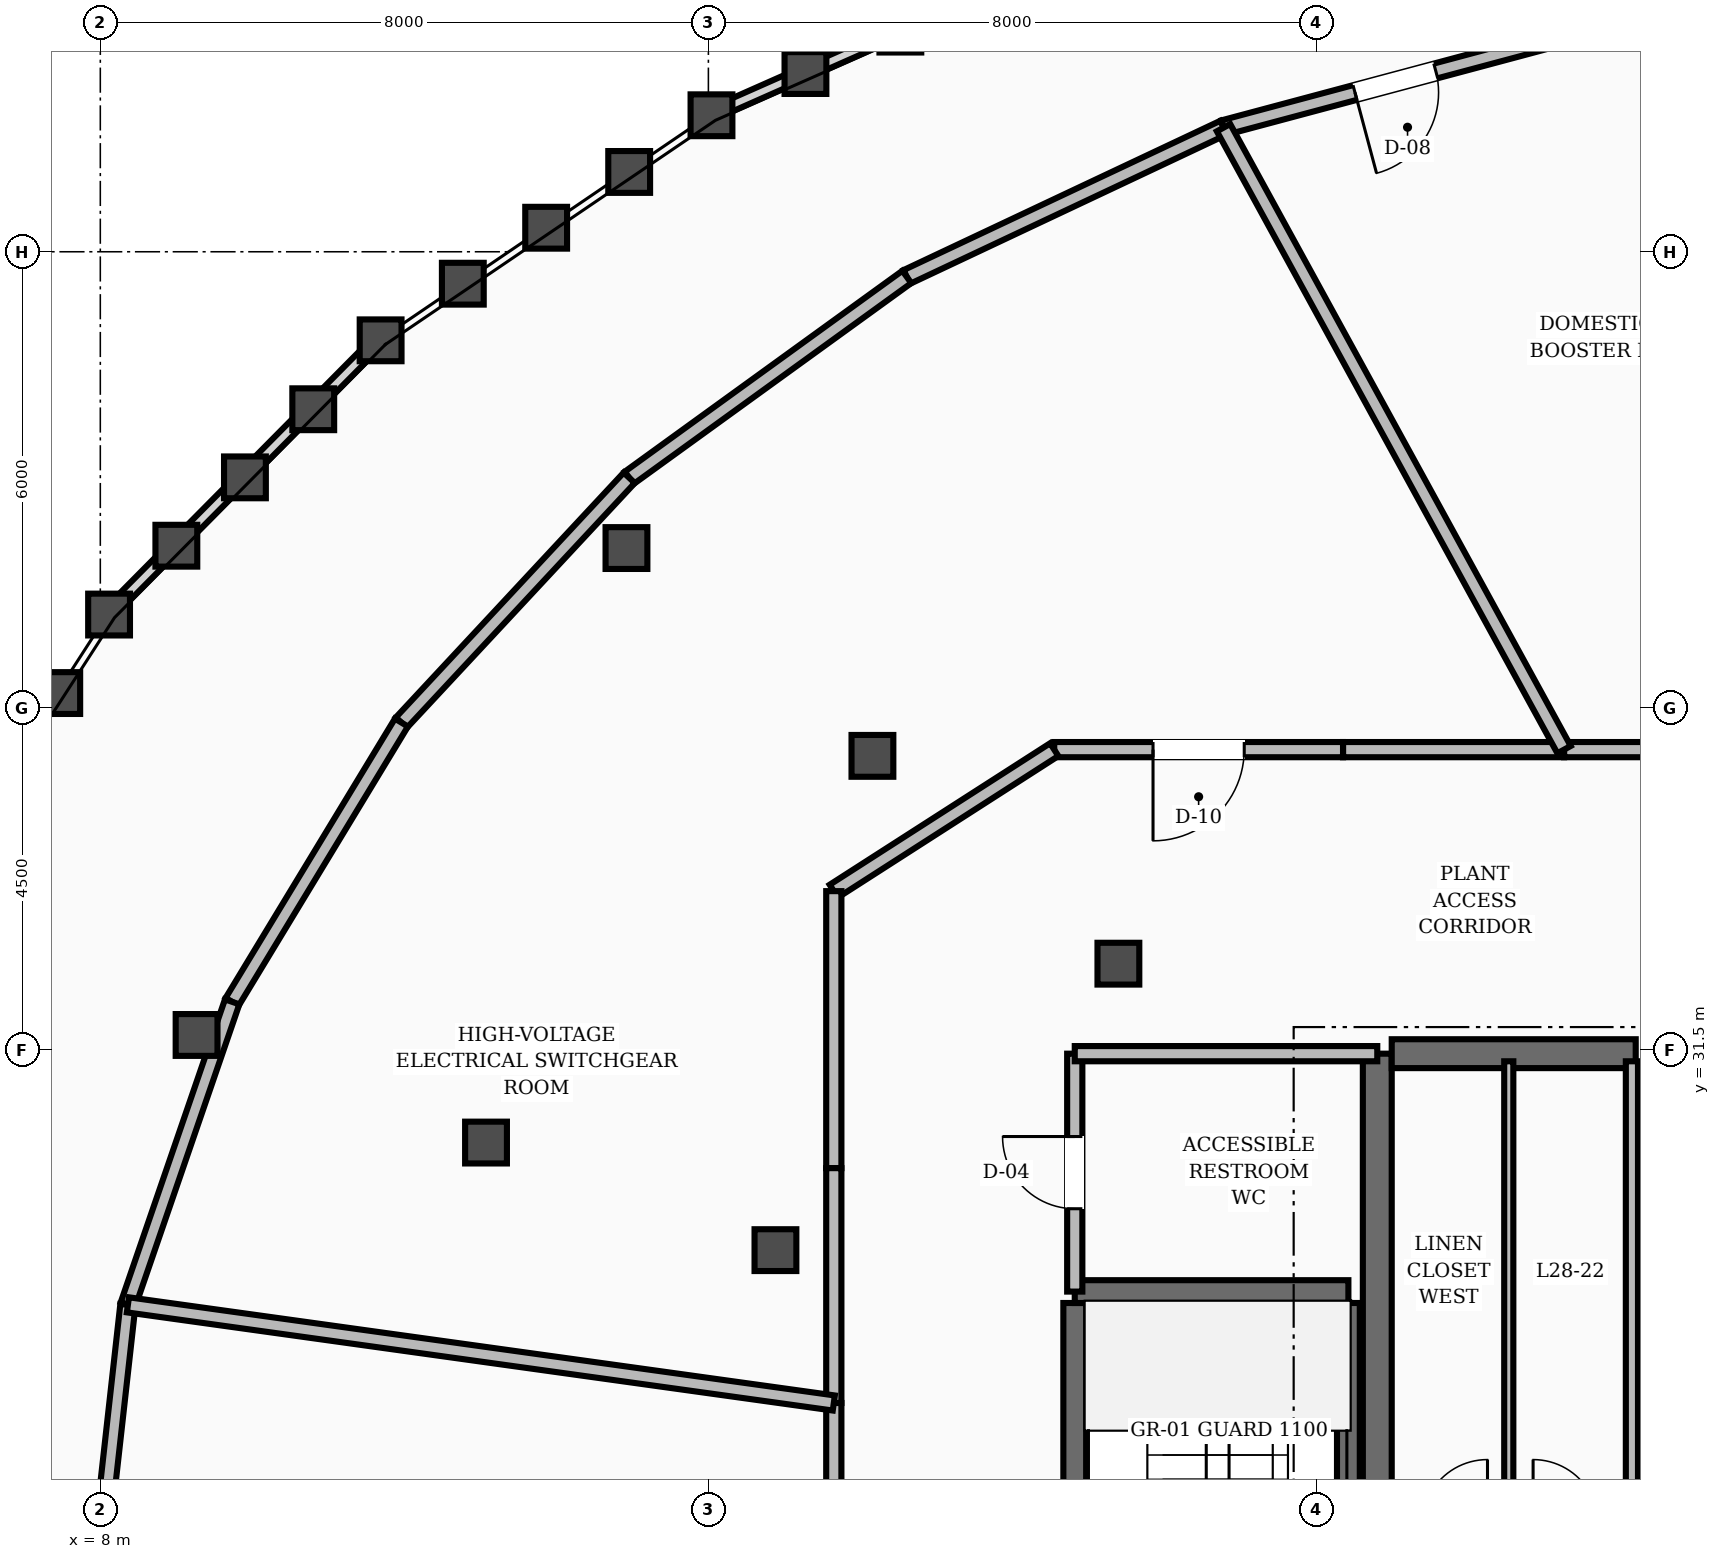
"""IFC4 building model, lengths in metres.
Left out: names, types, materials, properties, quantities, classifications, styles, units other than length and angle.
Written with IfcOpenShell. Run it as: python <this file> out.ifc"""

import sys

from ifc_helpers import new_model, si_unit, direction, frame, frame_2d, origin, place, context, subcontext, project, spatial, rectangle, extrude, element, fill, save


model = new_model("IFC4")
c1 = context("Model", 3, precision=1e-05, world=origin(), true_north=direction((0.0, 1.0)))
c2 = subcontext(c1, "Body", "Model", "MODEL_VIEW")
j1 = project(units=[si_unit("LENGTHUNIT", "METRE"), si_unit("PLANEANGLEUNIT", "RADIAN")], contexts=[c1])
p1 = place(None, origin())
s1 = spatial("IfcSite", under=j1, at=p1, CompositionType="ELEMENT")
p2 = place(p1, origin())
s2 = spatial("IfcBuilding", under=s1, at=p2, CompositionType="ELEMENT")
p3 = place(p2, frame((0.0, 0.0, 110.8)))
s3 = spatial("IfcBuildingStorey", under=s2, at=p3, CompositionType="ELEMENT", Elevation=110.8)
p4 = place(p3, frame((24.8, 25.15, 0.0), z_axis=(0.0, 0.0, 1.0), x_axis=(0.0, 1.0, 0.0)))
e1 = element("IfcWall", 1, at=p4, inside=s3, PredefinedType="SHEAR", context=c2, shape_type="SweptSolid", body=[
    extrude(rectangle(XDim=6.3, YDim=0.38, at=frame_2d((3.15, 0.0))), origin(), (0.0, 0.0, 1.0), 6.4),
])
p5 = place(p3, frame((24.99, 31.45, 0.0), z_axis=(0.0, 0.0, 1.0), x_axis=(1.0, 0.0, 0.0)))
e2 = element("IfcWall", 2, at=p5, inside=s3, PredefinedType="SHEAR", context=c2, shape_type="SweptSolid", body=[
    extrude(rectangle(XDim=3.21, YDim=0.38, at=frame_2d((1.605, 0.0))), origin(), (0.0, 0.0, 1.0), 6.4),
])
for number, where, z_axis, x_axis in (
    (3, (20.82, 19.43, 0.0), (0.0, 0.0, 1.0), (0.0, 1.0, 0.0)),
    (4, (24.42, 19.43, 0.0), (0.0, 0.0, 1.0), (0.0, 1.0, 0.0)),
):
    element("IfcWall", number, at=place(p3, frame(where, z_axis=z_axis, x_axis=x_axis)), inside=s3, PredefinedType="SHEAR", context=c2, shape_type="SweptSolid", body=[
        extrude(rectangle(XDim=8.74, YDim=0.3, at=frame_2d((4.37, 0.0))), origin(), (0.0, 0.0, 1.0), 6.4),
    ])
p6 = place(p3, frame((20.82, 28.32, 0.0), z_axis=(0.0, 0.0, 1.0), x_axis=(1.0, 0.0, 0.0)))
e5 = element("IfcWall", 5, at=p6, inside=s3, PredefinedType="SHEAR", context=c2, shape_type="SweptSolid", body=[
    extrude(rectangle(XDim=3.6, YDim=0.3, at=frame_2d((1.8, 0.0))), origin(), (0.0, 0.0, 1.0), 6.4),
])
p7 = place(p3, frame((20.82, 28.32, 0.0), z_axis=(0.0, 0.0, 1.0), x_axis=(0.0, 1.0, 0.0)))
e6 = element("IfcWall", 6, at=p7, inside=s3, PredefinedType="SOLIDWALL", context=c2, shape_type="SweptSolid", body=[
    extrude(rectangle(XDim=3.13, YDim=0.2, at=frame_2d((1.565, 0.0))), origin(), (0.0, 0.0, 1.0), 5.12),
])
p8 = place(p7, frame((1.09, 0.0, 0.0)))
e7 = element("IfcOpeningElement", 7, at=p8, cuts=e6, PredefinedType="OPENING", context=c2, shape_type="SweptSolid", body=[
    extrude(rectangle(XDim=0.95, YDim=2.1, at=frame_2d((0.475, 1.05))), frame((0.0, 0.11, 0.0), z_axis=(0.0, -1.0, 0.0), x_axis=(1.0, 0.0, 0.0)), (0.0, 0.0, 1.0), 0.22),
])
p9 = place(p3, frame((20.82, 31.45, 0.0), z_axis=(0.0, 0.0, 1.0), x_axis=(1.0, 0.0, 0.0)))
e8 = element("IfcWall", 8, at=p9, inside=s3, PredefinedType="SOLIDWALL", context=c2, shape_type="SweptSolid", body=[
    extrude(rectangle(XDim=3.98, YDim=0.2, at=frame_2d((1.99, 0.0))), origin(), (0.0, 0.0, 1.0), 5.12),
])
p10 = place(p3, frame((28.15, 25.25, 0.0), z_axis=(0.0, 0.0, 1.0), x_axis=(0.0, 1.0, 0.0)))
e9 = element("IfcWall", 9, at=p10, inside=s3, PredefinedType="SOLIDWALL", context=c2, shape_type="SweptSolid", body=[
    extrude(rectangle(XDim=6.1, YDim=0.16, at=frame_2d((3.05, 0.0))), origin(), (0.0, 0.0, 1.0), 5.12),
])
p11 = place(p3, frame((26.53, 25.25, 0.0), z_axis=(0.0, 0.0, 1.0), x_axis=(0.0, 1.0, 0.0)))
e10 = element("IfcWall", 10, at=p11, inside=s3, PredefinedType="PARTITIONING", context=c2, shape_type="SweptSolid", body=[
    extrude(rectangle(XDim=6.1, YDim=0.12, at=frame_2d((3.05, 0.0))), origin(), (0.0, 0.0, 1.0), 5.12),
])
p12 = place(p3, frame((27.298, 44.842, 0.0), z_axis=(0.0, 0.0, 1.0), x_axis=(-0.9660285601, -0.258435332473, 0.0)))
e11 = element("IfcWall", 11, at=p12, inside=s3, PredefinedType="SOLIDWALL", context=c2, shape_type="SweptSolid", body=[
    extrude(rectangle(XDim=4.68, YDim=0.2, at=frame_2d((2.34, 0.0))), origin(), (0.0, 0.0, 1.0), 5.12),
])
p13 = place(p12, frame((1.79, 0.0, 0.0)))
e12 = element("IfcOpeningElement", 12, at=p13, cuts=e11, PredefinedType="OPENING", context=c2, shape_type="SweptSolid", body=[
    extrude(rectangle(XDim=1.1, YDim=2.1, at=frame_2d((0.55, 1.05))), frame((0.0, 0.11, 0.0), z_axis=(0.0, -1.0, 0.0), x_axis=(1.0, 0.0, 0.0)), (0.0, 0.0, 1.0), 0.22),
])
p14 = place(p3, frame((22.777, 43.632, 0.0), z_axis=(0.0, 0.0, 1.0), x_axis=(-0.904574703116, -0.426315149253, 0.0)))
e13 = element("IfcWall", 13, at=p14, inside=s3, PredefinedType="SOLIDWALL", context=c2, shape_type="SweptSolid", body=[
    extrude(rectangle(XDim=4.606, YDim=0.2, at=frame_2d((2.303, 0.0))), origin(), (0.0, 0.0, 1.0), 5.12),
])
p15 = place(p3, frame((18.611, 41.669, 0.0), z_axis=(0.0, 0.0, 1.0), x_axis=(-0.810131923704, -0.586247615088, 0.0)))
e14 = element("IfcWall", 14, at=p15, inside=s3, PredefinedType="SOLIDWALL", context=c2, shape_type="SweptSolid", body=[
    extrude(rectangle(XDim=4.508, YDim=0.2, at=frame_2d((2.254, 0.0))), origin(), (0.0, 0.0, 1.0), 5.12),
])
p16 = place(p3, frame((14.959, 39.026, 0.0), z_axis=(0.0, 0.0, 1.0), x_axis=(-0.681317030747, -0.731988458661, 0.0)))
e15 = element("IfcWall", 15, at=p16, inside=s3, PredefinedType="SOLIDWALL", context=c2, shape_type="SweptSolid", body=[
    extrude(rectangle(XDim=4.399, YDim=0.2, at=frame_2d((2.199, 0.0))), origin(), (0.0, 0.0, 1.0), 5.12),
])
p17 = place(p3, frame((11.962, 35.806, 0.0), z_axis=(0.0, 0.0, 1.0), x_axis=(-0.518384837447, -0.855147449452, 0.0)))
e16 = element("IfcWall", 16, at=p17, inside=s3, PredefinedType="SOLIDWALL", context=c2, shape_type="SweptSolid", body=[
    extrude(rectangle(XDim=4.296, YDim=0.2, at=frame_2d((2.148, 0.0))), origin(), (0.0, 0.0, 1.0), 5.12),
])
p18 = place(p3, frame((9.735, 32.132, 0.0), z_axis=(0.0, 0.0, 1.0), x_axis=(-0.325351665006, -0.945593091175, 0.0)))
e17 = element("IfcWall", 17, at=p18, inside=s3, PredefinedType="SOLIDWALL", context=c2, shape_type="SweptSolid", body=[
    extrude(rectangle(XDim=4.216, YDim=0.2, at=frame_2d((2.108, 0.0))), origin(), (0.0, 0.0, 1.0), 5.12),
])
p19 = place(p3, frame((8.363, 28.146, 0.0), z_axis=(0.0, 0.0, 1.0), x_axis=(-0.111022469206, -0.993817896464, 0.0)))
e18 = element("IfcWall", 18, at=p19, inside=s3, PredefinedType="SOLIDWALL", context=c2, shape_type="SweptSolid", body=[
    extrude(rectangle(XDim=4.172, YDim=0.2, at=frame_2d((2.086, 0.0))), origin(), (0.0, 0.0, 1.0), 5.12),
])
p20 = place(p3, frame((29.722, 35.45, 0.0), z_axis=(0.0, 0.0, 1.0), x_axis=(-1.0, 0.0, 0.0)))
e19 = element("IfcWall", 19, at=p20, inside=s3, PredefinedType="SOLIDWALL", context=c2, shape_type="SweptSolid", body=[
    extrude(rectangle(XDim=2.465, YDim=0.2, at=frame_2d((1.232, 0.0))), origin(), (0.0, 0.0, 1.0), 5.12),
])
p21 = place(p3, frame((27.257, 35.45, 0.0), z_axis=(0.0, 0.0, 1.0), x_axis=(-1.0, 0.0, 0.0)))
e20 = element("IfcWall", 20, at=p21, inside=s3, PredefinedType="SOLIDWALL", context=c2, shape_type="SweptSolid", body=[
    extrude(rectangle(XDim=2.908, YDim=0.2, at=frame_2d((1.454, 0.0))), origin(), (0.0, 0.0, 1.0), 5.12),
])
p22 = place(p3, frame((24.349, 35.45, 0.0), z_axis=(0.0, 0.0, 1.0), x_axis=(-1.0, 0.0, 0.0)))
e21 = element("IfcWall", 21, at=p22, inside=s3, PredefinedType="SOLIDWALL", context=c2, shape_type="SweptSolid", body=[
    extrude(rectangle(XDim=3.799, YDim=0.2, at=frame_2d((1.9, 0.0))), origin(), (0.0, 0.0, 1.0), 5.12),
])
p23 = place(p22, frame((1.3, 0.0, 0.0)))
e22 = element("IfcOpeningElement", 22, at=p23, cuts=e21, PredefinedType="OPENING", context=c2, shape_type="SweptSolid", body=[
    extrude(rectangle(XDim=1.2, YDim=2.1, at=frame_2d((0.6, 1.05))), frame((0.0, 0.11, 0.0), z_axis=(0.0, -1.0, 0.0), x_axis=(1.0, 0.0, 0.0)), (0.0, 0.0, 1.0), 0.22),
])
p24 = place(p3, frame((20.55, 35.45, 0.0), z_axis=(0.0, 0.0, 1.0), x_axis=(-0.841548863049, -0.540180998464, 0.0)))
e23 = element("IfcWall", 23, at=p24, inside=s3, PredefinedType="SOLIDWALL", context=c2, shape_type="SweptSolid", body=[
    extrude(rectangle(XDim=3.446, YDim=0.2, at=frame_2d((1.723, 0.0))), origin(), (0.0, 0.0, 1.0), 5.12),
])
p25 = place(p3, frame((17.65, 33.588, 0.0), z_axis=(0.0, 0.0, 1.0), x_axis=(0.0, -1.0, 0.0)))
e24 = element("IfcWall", 24, at=p25, inside=s3, PredefinedType="SOLIDWALL", context=c2, shape_type="SweptSolid", body=[
    extrude(rectangle(XDim=3.644, YDim=0.2, at=frame_2d((1.822, 0.0))), origin(), (0.0, 0.0, 1.0), 5.12),
])
p26 = place(p3, frame((17.65, 29.944, 0.0), z_axis=(0.0, 0.0, 1.0), x_axis=(0.0, -1.0, 0.0)))
e25 = element("IfcWall", 25, at=p26, inside=s3, PredefinedType="SOLIDWALL", context=c2, shape_type="SweptSolid", body=[
    extrude(rectangle(XDim=3.09, YDim=0.2, at=frame_2d((1.545, 0.0))), origin(), (0.0, 0.0, 1.0), 5.12),
])
p27 = place(p3, frame((17.65, 26.854, 0.0), z_axis=(0.0, 0.0, 1.0), x_axis=(0.0, -1.0, 0.0)))
e26 = element("IfcWall", 26, at=p27, inside=s3, PredefinedType="SOLIDWALL", context=c2, shape_type="SweptSolid", body=[
    extrude(rectangle(XDim=2.854, YDim=0.2, at=frame_2d((1.427, 0.0))), origin(), (0.0, 0.0, 1.0), 5.12),
])
p28 = place(p3, frame((17.65, 26.854, 0.0), z_axis=(0.0, 0.0, 1.0), x_axis=(-0.990471664009, 0.137716675805, 0.0)))
e27 = element("IfcWall", 27, at=p28, inside=s3, PredefinedType="SOLIDWALL", context=c2, shape_type="SweptSolid", body=[
    extrude(rectangle(XDim=9.376, YDim=0.2, at=frame_2d((4.688, 0.0))), origin(), (0.0, 0.0, 1.0), 5.12),
])
p29 = place(p3, frame((27.257, 35.45, 0.0), z_axis=(0.0, 0.0, 1.0), x_axis=(-0.480245112504, 0.877134329459, 0.0)))
e28 = element("IfcWall", 28, at=p29, inside=s3, PredefinedType="SOLIDWALL", context=c2, shape_type="SweptSolid", body=[
    extrude(rectangle(XDim=9.329, YDim=0.2, at=frame_2d((4.664, 0.0))), origin(), (0.0, 0.0, 1.0), 5.12),
])
p30 = place(p8, origin())
e29 = element("IfcDoor", 29, at=p30, inside=s3, OperationType="SINGLE_SWING_RIGHT", PredefinedType="DOOR", context=c2, shape_type="SweptSolid", body=[
    extrude(rectangle(XDim=0.95, YDim=2.1, at=frame_2d((0.475, 1.05))), frame((0.0, 0.025, 0.0), z_axis=(0.0, -1.0, 0.0), x_axis=(1.0, 0.0, 0.0)), (0.0, 0.0, 1.0), 0.05),
])
fill(e7, e29)
p31 = place(p13, origin())
e30 = element("IfcDoor", 30, at=p31, inside=s3, OperationType="SINGLE_SWING_RIGHT", PredefinedType="DOOR", context=c2, shape_type="SweptSolid", body=[
    extrude(rectangle(XDim=1.1, YDim=2.1, at=frame_2d((0.55, 1.05))), frame((0.0, 0.025, 0.0), z_axis=(0.0, -1.0, 0.0), x_axis=(1.0, 0.0, 0.0)), (0.0, 0.0, 1.0), 0.05),
])
fill(e12, e30)
p32 = place(p23, origin())
e31 = element("IfcDoor", 31, at=p32, inside=s3, OperationType="SINGLE_SWING_RIGHT", PredefinedType="DOOR", context=c2, shape_type="SweptSolid", body=[
    extrude(rectangle(XDim=1.2, YDim=2.1, at=frame_2d((0.6, 1.05))), frame((0.0, 0.025, 0.0), z_axis=(0.0, -1.0, 0.0), x_axis=(1.0, 0.0, 0.0)), (0.0, 0.0, 1.0), 0.05),
])
fill(e22, e31)
save(model, sys.argv[1])
